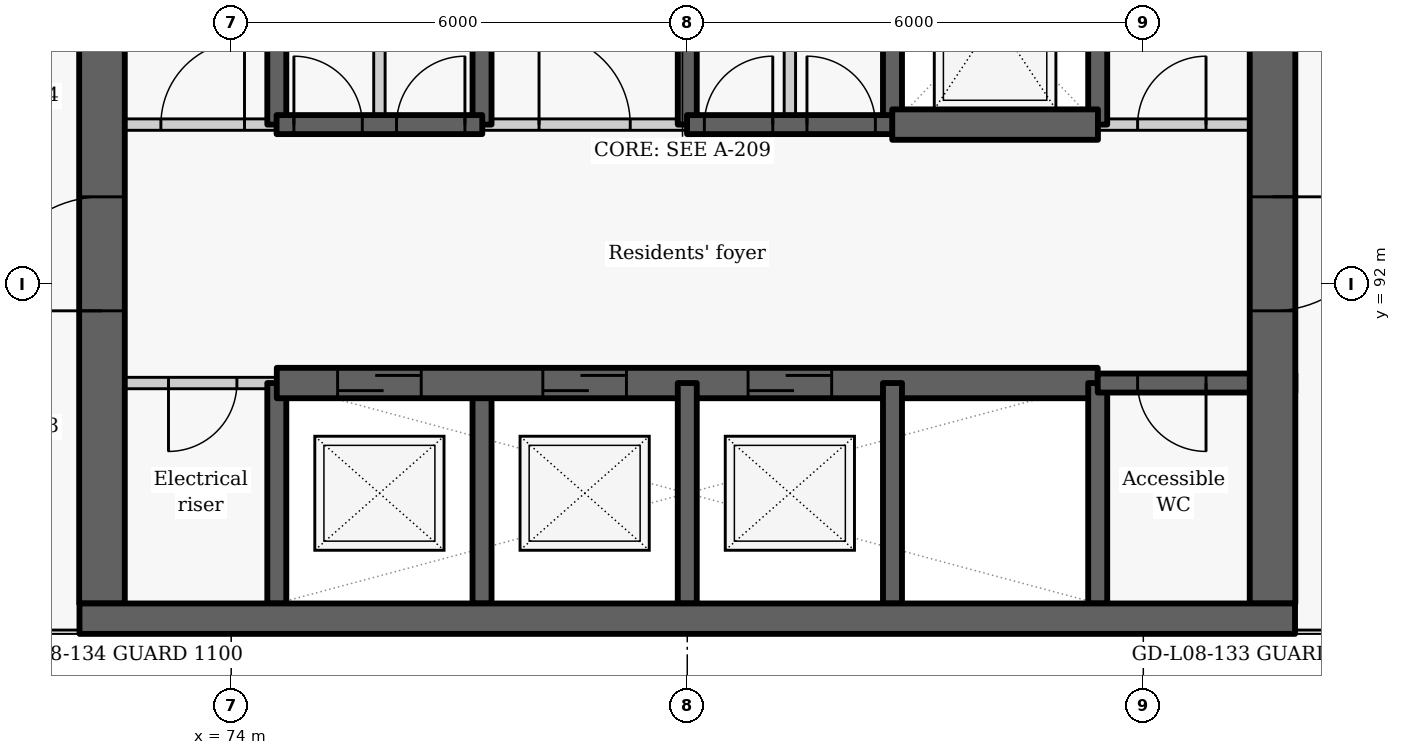
"""IFC4 building model, lengths in metres.
Left out: names, types, materials, properties, quantities, classifications, styles, units other than length and angle.
Written with IfcOpenShell. Run it as: python <this file> out.ifc"""

import sys

from ifc_helpers import new_model, si_unit, direction, frame, frame_2d, origin, place, context, subcontext, project, spatial, rectangle, extrude, element, fill, save


model = new_model("IFC4")
c1 = context("Model", 3, precision=1e-05, world=origin(), true_north=direction((0.0, 1.0)))
c2 = subcontext(c1, "Body", "Model", "MODEL_VIEW")
j1 = project(units=[si_unit("LENGTHUNIT", "METRE"), si_unit("PLANEANGLEUNIT", "RADIAN")], contexts=[c1])
p1 = place(None, origin())
s1 = spatial("IfcSite", under=j1, at=p1, CompositionType="ELEMENT")
p2 = place(p1, origin())
s2 = spatial("IfcBuilding", under=s1, at=p2, CompositionType="ELEMENT")
p3 = place(p2, frame((0.0, 0.0, 34.8)))
s3 = spatial("IfcBuildingStorey", under=s2, at=p3, CompositionType="ELEMENT", Elevation=34.8)
p4 = place(p3, frame((74.6, 87.8, -0.275), z_axis=(0.0, 0.0, 1.0), x_axis=(0.0, 1.0, 0.0)))
e1 = element("IfcWall", 1, at=p4, inside=s3, PredefinedType="SHEAR", context=c2, shape_type="SweptSolid", body=[
    extrude(rectangle(XDim=2.9, YDim=0.25, at=frame_2d((1.45, 0.0))), origin(), (0.0, 0.0, 1.0), 3.175),
])
p5 = place(p3, frame((74.6, 94.1, -0.275), z_axis=(0.0, 0.0, 1.0), x_axis=(0.0, 1.0, 0.0)))
e2 = element("IfcWall", 2, at=p5, inside=s3, PredefinedType="SHEAR", context=c2, shape_type="SweptSolid", body=[
    extrude(rectangle(XDim=2.8, YDim=0.25, at=frame_2d((1.4, 0.0))), origin(), (0.0, 0.0, 1.0), 3.175),
])
p6 = place(p3, frame((74.6, 90.7, 0.0), z_axis=(0.0, 0.0, 1.0), x_axis=(-1.0, 0.0, 0.0)))
e3 = element("IfcWall", 3, at=p6, inside=s3, PredefinedType="PARTITIONING", context=c2, shape_type="SweptSolid", body=[
    extrude(rectangle(XDim=2.6, YDim=0.15, at=frame_2d((1.3, 0.0))), origin(), (0.0, 0.0, 1.0), 2.9),
])
p7 = place(p6, frame((0.525, 0.0, 0.0)))
e4 = element("IfcOpeningElement", 4, at=p7, cuts=e3, PredefinedType="OPENING", context=c2, shape_type="SweptSolid", body=[
    extrude(rectangle(XDim=0.9, YDim=2.1, at=frame_2d((0.45, 1.05))), frame((0.0, 0.085, 0.0), z_axis=(0.0, -1.0, 0.0), x_axis=(1.0, 0.0, 0.0)), (0.0, 0.0, 1.0), 0.17),
])
p8 = place(p3, frame((72.3, 87.8, -0.275), z_axis=(0.0, 0.0, 1.0), x_axis=(0.0, 1.0, 0.0)))
e5 = element("IfcWall", 5, at=p8, inside=s3, PredefinedType="SHEAR", context=c2, shape_type="SweptSolid", body=[
    extrude(rectangle(XDim=9.1, YDim=0.6, at=frame_2d((4.55, 0.0))), origin(), (0.0, 0.0, 1.0), 3.175),
])
p9 = place(p8, frame((3.85, 0.0, 0.275)))
e6 = element("IfcOpeningElement", 6, at=p9, cuts=e5, PredefinedType="OPENING", context=c2, shape_type="SweptSolid", body=[
    extrude(rectangle(XDim=1.5, YDim=2.1, at=frame_2d((0.75, 1.05))), frame((0.0, 0.31, 0.0), z_axis=(0.0, -1.0, 0.0), x_axis=(1.0, 0.0, 0.0)), (0.0, 0.0, 1.0), 0.62),
])
p10 = place(p3, frame((77.3, 87.8, -0.275), z_axis=(0.0, 0.0, 1.0), x_axis=(0.0, 1.0, 0.0)))
e7 = element("IfcWall", 7, at=p10, inside=s3, PredefinedType="SHEAR", context=c2, shape_type="SweptSolid", body=[
    extrude(rectangle(XDim=2.9, YDim=0.25, at=frame_2d((1.45, 0.0))), origin(), (0.0, 0.0, 1.0), 3.175),
])
p11 = place(p3, frame((77.3, 94.1, -0.275), z_axis=(0.0, 0.0, 1.0), x_axis=(0.0, 1.0, 0.0)))
e8 = element("IfcWall", 8, at=p11, inside=s3, PredefinedType="SHEAR", context=c2, shape_type="SweptSolid", body=[
    extrude(rectangle(XDim=2.8, YDim=0.25, at=frame_2d((1.4, 0.0))), origin(), (0.0, 0.0, 1.0), 3.175),
])
p12 = place(p3, frame((74.6, 90.7, -0.275), z_axis=(0.0, 0.0, 1.0), x_axis=(1.0, 0.0, 0.0)))
e9 = element("IfcWall", 9, at=p12, inside=s3, PredefinedType="SHEAR", context=c2, shape_type="SweptSolid", body=[
    extrude(rectangle(XDim=10.8, YDim=0.4, at=frame_2d((5.4, 0.0))), origin(), (0.0, 0.0, 1.0), 3.175),
])
p13 = place(p12, frame((0.8, 0.0, 0.275)))
e10 = element("IfcOpeningElement", 10, at=p13, cuts=e9, PredefinedType="OPENING", context=c2, shape_type="SweptSolid", body=[
    extrude(rectangle(XDim=1.1, YDim=2.1, at=frame_2d((0.55, 1.05))), frame((0.0, 0.21, 0.0), z_axis=(0.0, -1.0, 0.0), x_axis=(1.0, 0.0, 0.0)), (0.0, 0.0, 1.0), 0.42),
])
p14 = place(p12, frame((3.5, 0.0, 0.275)))
e11 = element("IfcOpeningElement", 11, at=p14, cuts=e9, PredefinedType="OPENING", context=c2, shape_type="SweptSolid", body=[
    extrude(rectangle(XDim=1.1, YDim=2.1, at=frame_2d((0.55, 1.05))), frame((0.0, 0.21, 0.0), z_axis=(0.0, -1.0, 0.0), x_axis=(1.0, 0.0, 0.0)), (0.0, 0.0, 1.0), 0.42),
])
p15 = place(p12, frame((6.2, 0.0, 0.275)))
e12 = element("IfcOpeningElement", 12, at=p15, cuts=e9, PredefinedType="OPENING", context=c2, shape_type="SweptSolid", body=[
    extrude(rectangle(XDim=1.1, YDim=2.1, at=frame_2d((0.55, 1.05))), frame((0.0, 0.21, 0.0), z_axis=(0.0, -1.0, 0.0), x_axis=(1.0, 0.0, 0.0)), (0.0, 0.0, 1.0), 0.42),
])
p16 = place(p3, frame((80.0, 87.8, -0.275), z_axis=(0.0, 0.0, 1.0), x_axis=(0.0, 1.0, 0.0)))
e13 = element("IfcWall", 13, at=p16, inside=s3, PredefinedType="SHEAR", context=c2, shape_type="SweptSolid", body=[
    extrude(rectangle(XDim=2.9, YDim=0.25, at=frame_2d((1.45, 0.0))), origin(), (0.0, 0.0, 1.0), 3.175),
])
p17 = place(p3, frame((80.0, 94.1, -0.275), z_axis=(0.0, 0.0, 1.0), x_axis=(0.0, 1.0, 0.0)))
e14 = element("IfcWall", 14, at=p17, inside=s3, PredefinedType="SHEAR", context=c2, shape_type="SweptSolid", body=[
    extrude(rectangle(XDim=2.8, YDim=0.25, at=frame_2d((1.4, 0.0))), origin(), (0.0, 0.0, 1.0), 3.175),
])
p18 = place(p3, frame((82.7, 87.8, -0.275), z_axis=(0.0, 0.0, 1.0), x_axis=(0.0, 1.0, 0.0)))
e15 = element("IfcWall", 15, at=p18, inside=s3, PredefinedType="SHEAR", context=c2, shape_type="SweptSolid", body=[
    extrude(rectangle(XDim=2.9, YDim=0.25, at=frame_2d((1.45, 0.0))), origin(), (0.0, 0.0, 1.0), 3.175),
])
p19 = place(p3, frame((82.7, 94.1, -0.275), z_axis=(0.0, 0.0, 1.0), x_axis=(0.0, 1.0, 0.0)))
e16 = element("IfcWall", 16, at=p19, inside=s3, PredefinedType="SHEAR", context=c2, shape_type="SweptSolid", body=[
    extrude(rectangle(XDim=2.8, YDim=0.25, at=frame_2d((1.4, 0.0))), origin(), (0.0, 0.0, 1.0), 3.175),
])
p20 = place(p3, frame((85.4, 87.8, -0.275), z_axis=(0.0, 0.0, 1.0), x_axis=(0.0, 1.0, 0.0)))
e17 = element("IfcWall", 17, at=p20, inside=s3, PredefinedType="SHEAR", context=c2, shape_type="SweptSolid", body=[
    extrude(rectangle(XDim=2.9, YDim=0.25, at=frame_2d((1.45, 0.0))), origin(), (0.0, 0.0, 1.0), 3.175),
])
p21 = place(p3, frame((85.4, 94.1, -0.275), z_axis=(0.0, 0.0, 1.0), x_axis=(0.0, 1.0, 0.0)))
e18 = element("IfcWall", 18, at=p21, inside=s3, PredefinedType="SHEAR", context=c2, shape_type="SweptSolid", body=[
    extrude(rectangle(XDim=2.8, YDim=0.25, at=frame_2d((1.4, 0.0))), origin(), (0.0, 0.0, 1.0), 3.175),
])
p22 = place(p3, frame((88.0, 90.7, -0.275), z_axis=(0.0, 0.0, 1.0), x_axis=(-1.0, 0.0, 0.0)))
e19 = element("IfcWall", 19, at=p22, inside=s3, PredefinedType="SHEAR", context=c2, shape_type="SweptSolid", body=[
    extrude(rectangle(XDim=2.6, YDim=0.25, at=frame_2d((1.3, 0.0))), origin(), (0.0, 0.0, 1.0), 3.175),
])
p23 = place(p22, frame((1.175, 0.0, 0.275)))
e20 = element("IfcOpeningElement", 20, at=p23, cuts=e19, PredefinedType="OPENING", context=c2, shape_type="SweptSolid", body=[
    extrude(rectangle(XDim=0.9, YDim=2.1, at=frame_2d((0.45, 1.05))), frame((0.0, 0.135, 0.0), z_axis=(0.0, -1.0, 0.0), x_axis=(1.0, 0.0, 0.0)), (0.0, 0.0, 1.0), 0.27),
])
p24 = place(p3, frame((87.7, 103.4, -0.275), z_axis=(0.0, 0.0, 1.0), x_axis=(0.0, -1.0, 0.0)))
e21 = element("IfcWall", 21, at=p24, inside=s3, PredefinedType="SHEAR", context=c2, shape_type="SweptSolid", body=[
    extrude(rectangle(XDim=15.6, YDim=0.6, at=frame_2d((7.8, 0.0))), origin(), (0.0, 0.0, 1.0), 3.175),
])
p25 = place(p24, frame((10.25, 0.0, 0.275)))
e22 = element("IfcOpeningElement", 22, at=p25, cuts=e21, PredefinedType="OPENING", context=c2, shape_type="SweptSolid", body=[
    extrude(rectangle(XDim=1.5, YDim=2.1, at=frame_2d((0.75, 1.05))), frame((0.0, 0.31, 0.0), z_axis=(0.0, -1.0, 0.0), x_axis=(1.0, 0.0, 0.0)), (0.0, 0.0, 1.0), 0.62),
])
p26 = place(p24, frame((2.7, 0.0, 0.275)))
e23 = element("IfcOpeningElement", 23, at=p26, cuts=e21, PredefinedType="OPENING", context=c2, shape_type="SweptSolid", body=[
    extrude(rectangle(XDim=1.1, YDim=2.1, at=frame_2d((0.55, 1.05))), frame((0.0, 0.31, 0.0), z_axis=(0.0, -1.0, 0.0), x_axis=(1.0, 0.0, 0.0)), (0.0, 0.0, 1.0), 0.62),
])
p27 = place(p3, frame((72.0, 94.1, 0.0), z_axis=(0.0, 0.0, 1.0), x_axis=(1.0, 0.0, 0.0)))
e24 = element("IfcWall", 24, at=p27, inside=s3, PredefinedType="PARTITIONING", context=c2, shape_type="SweptSolid", body=[
    extrude(rectangle(XDim=2.603, YDim=0.15, at=frame_2d((1.302, 0.0))), origin(), (0.0, 0.0, 1.0), 2.9),
])
p28 = place(p27, frame((1.075, 0.0, 0.0)))
e25 = element("IfcOpeningElement", 25, at=p28, cuts=e24, PredefinedType="OPENING", context=c2, shape_type="SweptSolid", body=[
    extrude(rectangle(XDim=1.1, YDim=2.1, at=frame_2d((0.55, 1.05))), frame((0.0, 0.085, 0.0), z_axis=(0.0, -1.0, 0.0), x_axis=(1.0, 0.0, 0.0)), (0.0, 0.0, 1.0), 0.17),
])
p29 = place(p3, frame((77.297, 94.1, 0.0), z_axis=(0.0, 0.0, 1.0), x_axis=(1.0, 0.0, 0.0)))
e26 = element("IfcWall", 26, at=p29, inside=s3, PredefinedType="PARTITIONING", context=c2, shape_type="SweptSolid", body=[
    extrude(rectangle(XDim=2.706, YDim=0.15, at=frame_2d((1.353, 0.0))), origin(), (0.0, 0.0, 1.0), 2.9),
])
p30 = place(p29, frame((0.753, 0.0, 0.0)))
e27 = element("IfcOpeningElement", 27, at=p30, cuts=e26, PredefinedType="OPENING", context=c2, shape_type="SweptSolid", body=[
    extrude(rectangle(XDim=1.2, YDim=2.1, at=frame_2d((0.6, 1.05))), frame((0.0, 0.085, 0.0), z_axis=(0.0, -1.0, 0.0), x_axis=(1.0, 0.0, 0.0)), (0.0, 0.0, 1.0), 0.17),
])
p31 = place(p3, frame((85.397, 94.1, 0.0), z_axis=(0.0, 0.0, 1.0), x_axis=(1.0, 0.0, 0.0)))
e28 = element("IfcWall", 28, at=p31, inside=s3, PredefinedType="PARTITIONING", context=c2, shape_type="SweptSolid", body=[
    extrude(rectangle(XDim=2.603, YDim=0.15, at=frame_2d((1.302, 0.0))), origin(), (0.0, 0.0, 1.0), 2.9),
])
p32 = place(p31, frame((0.528, 0.0, 0.0)))
e29 = element("IfcOpeningElement", 29, at=p32, cuts=e28, PredefinedType="OPENING", context=c2, shape_type="SweptSolid", body=[
    extrude(rectangle(XDim=0.9, YDim=2.1, at=frame_2d((0.45, 1.05))), frame((0.0, 0.085, 0.0), z_axis=(0.0, -1.0, 0.0), x_axis=(1.0, 0.0, 0.0)), (0.0, 0.0, 1.0), 0.17),
])
p33 = place(p3, frame((74.597, 94.1, -0.275), z_axis=(0.0, 0.0, 1.0), x_axis=(1.0, 0.0, 0.0)))
e30 = element("IfcWall", 30, at=p33, inside=s3, PredefinedType="SHEAR", context=c2, shape_type="SweptSolid", body=[
    extrude(rectangle(XDim=2.706, YDim=0.25, at=frame_2d((1.353, 0.0))), origin(), (0.0, 0.0, 1.0), 3.175),
])
p34 = place(p33, frame((0.228, 0.0, 0.275)))
e31 = element("IfcOpeningElement", 31, at=p34, cuts=e30, PredefinedType="OPENING", context=c2, shape_type="SweptSolid", body=[
    extrude(rectangle(XDim=0.9, YDim=2.1, at=frame_2d((0.45, 1.05))), frame((0.0, 0.135, 0.0), z_axis=(0.0, -1.0, 0.0), x_axis=(1.0, 0.0, 0.0)), (0.0, 0.0, 1.0), 0.27),
])
p35 = place(p33, frame((1.578, 0.0, 0.275)))
e32 = element("IfcOpeningElement", 32, at=p35, cuts=e30, PredefinedType="OPENING", context=c2, shape_type="SweptSolid", body=[
    extrude(rectangle(XDim=0.9, YDim=2.1, at=frame_2d((0.45, 1.05))), frame((0.0, 0.135, 0.0), z_axis=(0.0, -1.0, 0.0), x_axis=(1.0, 0.0, 0.0)), (0.0, 0.0, 1.0), 0.27),
])
p36 = place(p3, frame((79.997, 94.1, -0.275), z_axis=(0.0, 0.0, 1.0), x_axis=(1.0, 0.0, 0.0)))
e33 = element("IfcWall", 33, at=p36, inside=s3, PredefinedType="SHEAR", context=c2, shape_type="SweptSolid", body=[
    extrude(rectangle(XDim=2.706, YDim=0.25, at=frame_2d((1.353, 0.0))), origin(), (0.0, 0.0, 1.0), 3.175),
])
p37 = place(p36, frame((0.228, 0.0, 0.275)))
e34 = element("IfcOpeningElement", 34, at=p37, cuts=e33, PredefinedType="OPENING", context=c2, shape_type="SweptSolid", body=[
    extrude(rectangle(XDim=0.9, YDim=2.1, at=frame_2d((0.45, 1.05))), frame((0.0, 0.135, 0.0), z_axis=(0.0, -1.0, 0.0), x_axis=(1.0, 0.0, 0.0)), (0.0, 0.0, 1.0), 0.27),
])
p38 = place(p36, frame((1.578, 0.0, 0.275)))
e35 = element("IfcOpeningElement", 35, at=p38, cuts=e33, PredefinedType="OPENING", context=c2, shape_type="SweptSolid", body=[
    extrude(rectangle(XDim=0.9, YDim=2.1, at=frame_2d((0.45, 1.05))), frame((0.0, 0.135, 0.0), z_axis=(0.0, -1.0, 0.0), x_axis=(1.0, 0.0, 0.0)), (0.0, 0.0, 1.0), 0.27),
])
p39 = place(p3, frame((82.697, 94.1, -0.275), z_axis=(0.0, 0.0, 1.0), x_axis=(1.0, 0.0, 0.0)))
e36 = element("IfcWall", 36, at=p39, inside=s3, PredefinedType="SHEAR", context=c2, shape_type="SweptSolid", body=[
    extrude(rectangle(XDim=2.706, YDim=0.4, at=frame_2d((1.353, 0.0))), origin(), (0.0, 0.0, 1.0), 3.175),
])
for number, where, z_axis, x_axis in (
    (37, (75.95, 94.1, 0.0), (0.0, 0.0, 1.0), (0.0, 1.0, 0.0)),
    (38, (81.35, 94.1, 0.0), (0.0, 0.0, 1.0), (0.0, 1.0, 0.0)),
):
    element("IfcWall", number, at=place(p3, frame(where, z_axis=z_axis, x_axis=x_axis)), inside=s3, PredefinedType="PARTITIONING", context=c2, shape_type="SweptSolid", body=[
        extrude(rectangle(XDim=2.8, YDim=0.15, at=frame_2d((1.4, 0.0))), origin(), (0.0, 0.0, 1.0), 2.9),
    ])
p40 = place(p3, frame((72.004, 87.6, -0.275), z_axis=(0.0, 0.0, 1.0), x_axis=(1.0, 0.0, 0.0)))
e39 = element("IfcWall", 39, at=p40, inside=s3, PredefinedType="SHEAR", context=c2, shape_type="SweptSolid", body=[
    extrude(rectangle(XDim=15.992, YDim=0.4, at=frame_2d((7.996, 0.0))), origin(), (0.0, 0.0, 1.0), 3.175),
])
p41 = place(p7, origin())
e40 = element("IfcDoor", 40, at=p41, inside=s3, OperationType="SINGLE_SWING_RIGHT", PredefinedType="DOOR", context=c2, shape_type="SweptSolid", body=[
    extrude(rectangle(XDim=0.9, YDim=2.1, at=frame_2d((0.45, 1.05))), frame((0.0, 0.025, 0.0), z_axis=(0.0, -1.0, 0.0), x_axis=(1.0, 0.0, 0.0)), (0.0, 0.0, 1.0), 0.05),
])
fill(e4, e40)
p42 = place(p13, origin())
e41 = element("IfcDoor", 41, at=p42, inside=s3, OperationType="SLIDING_TO_LEFT", PredefinedType="DOOR", context=c2, shape_type="SweptSolid", body=[
    extrude(rectangle(XDim=1.1, YDim=2.1, at=frame_2d((0.55, 1.05))), frame((0.0, 0.025, 0.0), z_axis=(0.0, -1.0, 0.0), x_axis=(1.0, 0.0, 0.0)), (0.0, 0.0, 1.0), 0.05),
])
fill(e10, e41)
p43 = place(p14, origin())
e42 = element("IfcDoor", 42, at=p43, inside=s3, OperationType="SLIDING_TO_LEFT", PredefinedType="DOOR", context=c2, shape_type="SweptSolid", body=[
    extrude(rectangle(XDim=1.1, YDim=2.1, at=frame_2d((0.55, 1.05))), frame((0.0, 0.025, 0.0), z_axis=(0.0, -1.0, 0.0), x_axis=(1.0, 0.0, 0.0)), (0.0, 0.0, 1.0), 0.05),
])
fill(e11, e42)
p44 = place(p15, origin())
e43 = element("IfcDoor", 43, at=p44, inside=s3, OperationType="SLIDING_TO_LEFT", PredefinedType="DOOR", context=c2, shape_type="SweptSolid", body=[
    extrude(rectangle(XDim=1.1, YDim=2.1, at=frame_2d((0.55, 1.05))), frame((0.0, 0.025, 0.0), z_axis=(0.0, -1.0, 0.0), x_axis=(1.0, 0.0, 0.0)), (0.0, 0.0, 1.0), 0.05),
])
fill(e12, e43)
p45 = place(p23, origin())
e44 = element("IfcDoor", 44, at=p45, inside=s3, OperationType="SINGLE_SWING_LEFT", PredefinedType="DOOR", context=c2, shape_type="SweptSolid", body=[
    extrude(rectangle(XDim=0.9, YDim=2.1, at=frame_2d((0.45, 1.05))), frame((0.0, 0.025, 0.0), z_axis=(0.0, -1.0, 0.0), x_axis=(1.0, 0.0, 0.0)), (0.0, 0.0, 1.0), 0.05),
])
fill(e20, e44)
p46 = place(p28, origin())
e45 = element("IfcDoor", 45, at=p46, inside=s3, OperationType="SINGLE_SWING_RIGHT", PredefinedType="DOOR", context=c2, shape_type="SweptSolid", body=[
    extrude(rectangle(XDim=1.1, YDim=2.1, at=frame_2d((0.55, 1.05))), frame((0.0, 0.025, 0.0), z_axis=(0.0, -1.0, 0.0), x_axis=(1.0, 0.0, 0.0)), (0.0, 0.0, 1.0), 0.05),
])
fill(e25, e45)
p47 = place(p34, origin())
e46 = element("IfcDoor", 46, at=p47, inside=s3, OperationType="SINGLE_SWING_LEFT", PredefinedType="DOOR", context=c2, shape_type="SweptSolid", body=[
    extrude(rectangle(XDim=0.9, YDim=2.1, at=frame_2d((0.45, 1.05))), frame((0.0, 0.025, 0.0), z_axis=(0.0, -1.0, 0.0), x_axis=(1.0, 0.0, 0.0)), (0.0, 0.0, 1.0), 0.05),
])
fill(e31, e46)
p48 = place(p35, origin())
e47 = element("IfcDoor", 47, at=p48, inside=s3, OperationType="SINGLE_SWING_RIGHT", PredefinedType="DOOR", context=c2, shape_type="SweptSolid", body=[
    extrude(rectangle(XDim=0.9, YDim=2.1, at=frame_2d((0.45, 1.05))), frame((0.0, 0.025, 0.0), z_axis=(0.0, -1.0, 0.0), x_axis=(1.0, 0.0, 0.0)), (0.0, 0.0, 1.0), 0.05),
])
fill(e32, e47)
p49 = place(p30, origin())
e48 = element("IfcDoor", 48, at=p49, inside=s3, OperationType="DOUBLE_DOOR_SINGLE_SWING", PredefinedType="DOOR", context=c2, shape_type="SweptSolid", body=[
    extrude(rectangle(XDim=1.2, YDim=2.1, at=frame_2d((0.6, 1.05))), frame((0.0, 0.025, 0.0), z_axis=(0.0, -1.0, 0.0), x_axis=(1.0, 0.0, 0.0)), (0.0, 0.0, 1.0), 0.05),
])
fill(e27, e48)
p50 = place(p37, origin())
e49 = element("IfcDoor", 49, at=p50, inside=s3, OperationType="SINGLE_SWING_RIGHT", PredefinedType="DOOR", context=c2, shape_type="SweptSolid", body=[
    extrude(rectangle(XDim=0.9, YDim=2.1, at=frame_2d((0.45, 1.05))), frame((0.0, 0.025, 0.0), z_axis=(0.0, -1.0, 0.0), x_axis=(1.0, 0.0, 0.0)), (0.0, 0.0, 1.0), 0.05),
])
fill(e34, e49)
p51 = place(p38, origin())
e50 = element("IfcDoor", 50, at=p51, inside=s3, OperationType="SINGLE_SWING_LEFT", PredefinedType="DOOR", context=c2, shape_type="SweptSolid", body=[
    extrude(rectangle(XDim=0.9, YDim=2.1, at=frame_2d((0.45, 1.05))), frame((0.0, 0.025, 0.0), z_axis=(0.0, -1.0, 0.0), x_axis=(1.0, 0.0, 0.0)), (0.0, 0.0, 1.0), 0.05),
])
fill(e35, e50)
p52 = place(p32, origin())
e51 = element("IfcDoor", 51, at=p52, inside=s3, OperationType="SINGLE_SWING_RIGHT", PredefinedType="DOOR", context=c2, shape_type="SweptSolid", body=[
    extrude(rectangle(XDim=0.9, YDim=2.1, at=frame_2d((0.45, 1.05))), frame((0.0, 0.025, 0.0), z_axis=(0.0, -1.0, 0.0), x_axis=(1.0, 0.0, 0.0)), (0.0, 0.0, 1.0), 0.05),
])
fill(e29, e51)
p53 = place(p25, origin())
e52 = element("IfcDoor", 52, at=p53, inside=s3, OperationType="DOUBLE_DOOR_SINGLE_SWING", PredefinedType="DOOR", context=c2, shape_type="SweptSolid", body=[
    extrude(rectangle(XDim=1.5, YDim=2.1, at=frame_2d((0.75, 1.05))), frame((0.0, 0.025, 0.0), z_axis=(0.0, -1.0, 0.0), x_axis=(1.0, 0.0, 0.0)), (0.0, 0.0, 1.0), 0.05),
])
fill(e22, e52)
p54 = place(p9, origin())
e53 = element("IfcDoor", 53, at=p54, inside=s3, OperationType="DOUBLE_DOOR_SINGLE_SWING", PredefinedType="DOOR", context=c2, shape_type="SweptSolid", body=[
    extrude(rectangle(XDim=1.5, YDim=2.1, at=frame_2d((0.75, 1.05))), frame((0.0, 0.025, 0.0), z_axis=(0.0, -1.0, 0.0), x_axis=(1.0, 0.0, 0.0)), (0.0, 0.0, 1.0), 0.05),
])
fill(e6, e53)
save(model, sys.argv[1])
